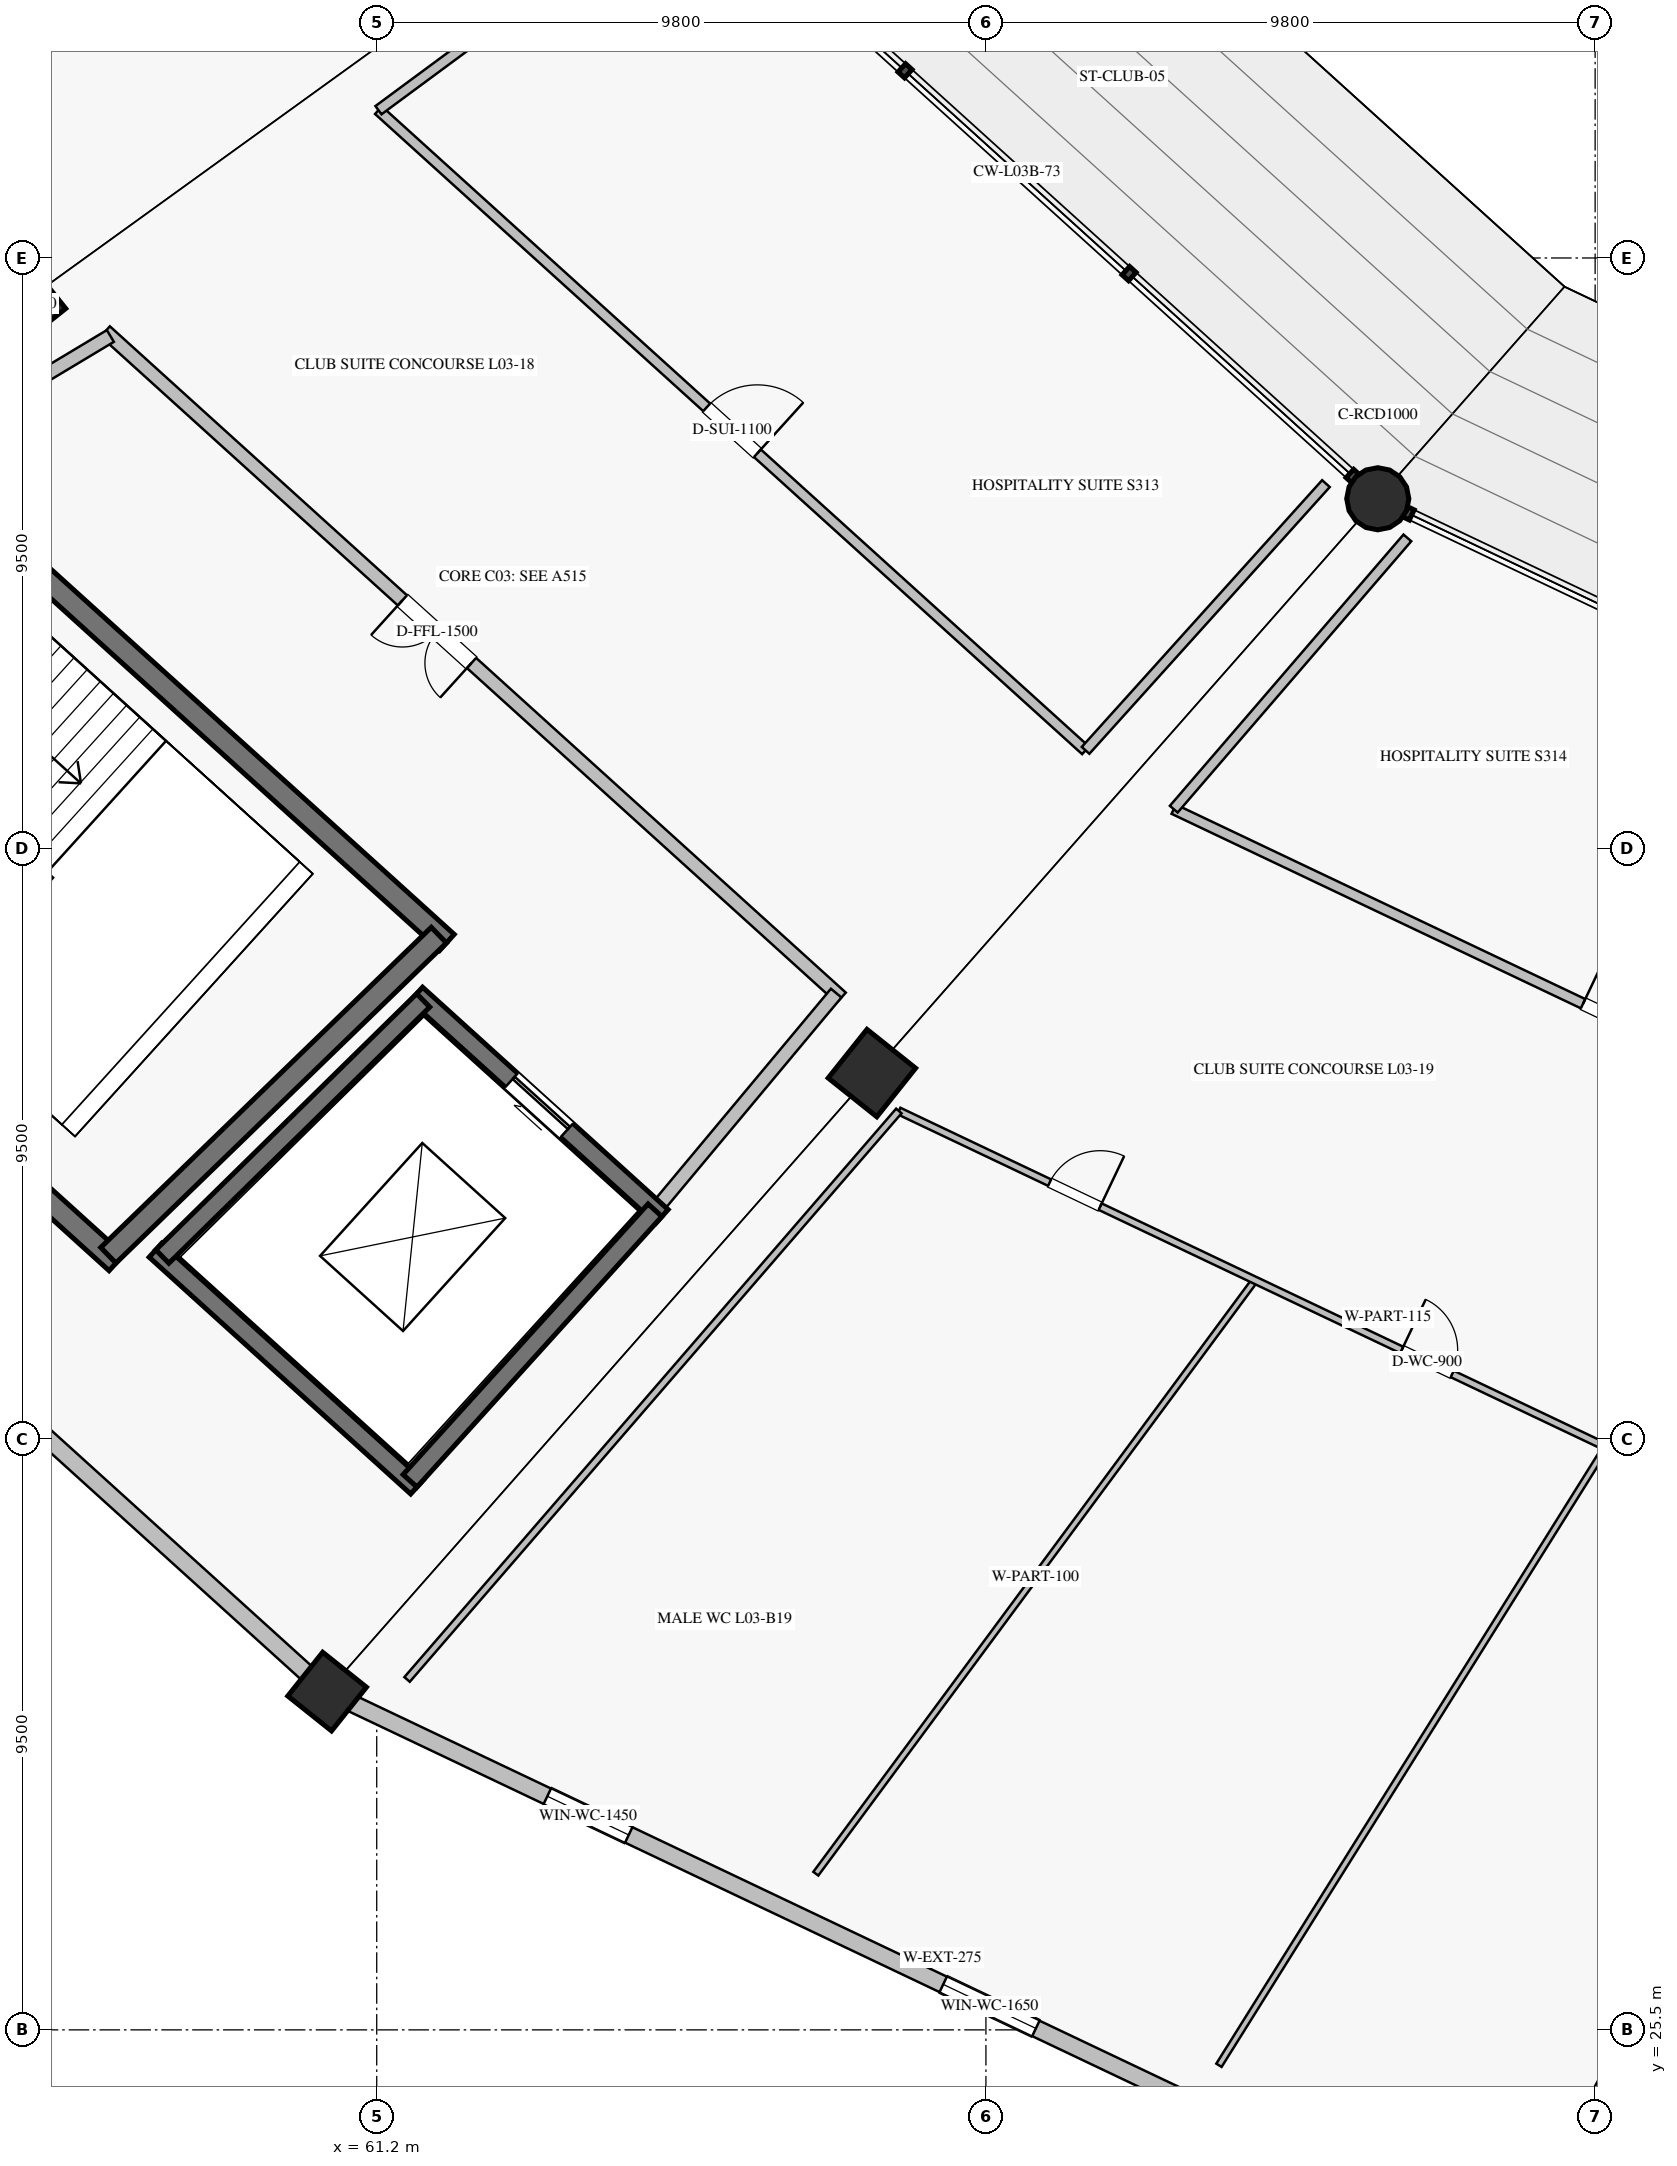
"""IFC4 building model, lengths in metres.
Left out: names, types, materials, properties, quantities, classifications, styles, units other than length and angle.
Written with IfcOpenShell. Run it as: python <this file> out.ifc"""

import sys

from ifc_helpers import new_model, si_unit, direction, frame, frame_2d, origin, origin_2d, place, context, subcontext, project, spatial, rectangle, circle, extrude, element, fill, save


model = new_model("IFC4")
c1 = context("Model", 3, precision=1e-05, world=origin(), true_north=direction((0.0, 1.0)))
c2 = subcontext(c1, "Body", "Model", "MODEL_VIEW")
j1 = project(units=[si_unit("LENGTHUNIT", "METRE"), si_unit("PLANEANGLEUNIT", "RADIAN")], contexts=[c1])
p1 = place(None, origin())
s1 = spatial("IfcSite", under=j1, at=p1, CompositionType="ELEMENT")
p2 = place(p1, origin())
s2 = spatial("IfcBuilding", under=s1, at=p2, CompositionType="ELEMENT")
p3 = place(p2, frame((0.0, 0.0, 15.64)))
s3 = spatial("IfcBuildingStorey", under=s2, at=p3, CompositionType="ELEMENT", Elevation=15.64)
p4 = place(p3, frame((77.303, 50.127, 0.0), z_axis=(0.0, 0.0, 1.0), x_axis=(-0.623489801853, -0.781831482473, 0.0)))
e1 = element("IfcColumn", 1, at=p4, inside=s3, PredefinedType="COLUMN", context=c2, shape_type="SweptSolid", body=[
    extrude(circle(Radius=0.5, at=origin_2d()), origin(), (0.0, 0.0, 1.0), 4.76),
])
for number, where, z_axis, x_axis in (
    (2, (55.494, 53.266, 0.0), (0.0, 0.0, 1.0), (-0.782, -0.623, 0.0)),
    (3, (69.166, 40.889, 0.0), (0.0, 0.0, 1.0), (-0.623, -0.782, 0.0)),
):
    element("IfcColumn", number, at=place(p3, frame(where, z_axis=z_axis, x_axis=x_axis)), inside=s3, PredefinedType="COLUMN", context=c2, shape_type="SweptSolid", body=[
        extrude(rectangle(XDim=1.0, YDim=1.0, at=origin_2d()), origin(), (0.0, 0.0, 1.0), 4.76),
    ])
p5 = place(p3, frame((60.402, 30.941, 0.0), z_axis=(0.0, 0.0, 1.0), x_axis=(-0.623489801853, -0.781831482473, 0.0)))
e4 = element("IfcColumn", 4, at=p5, inside=s3, PredefinedType="COLUMN", context=c2, shape_type="SweptSolid", body=[
    extrude(rectangle(XDim=0.9, YDim=0.9, at=origin_2d()), origin(), (0.0, 0.0, 1.0), 4.76),
])
p6 = place(p3, frame((44.831, 45.037, 0.0), z_axis=(0.0, 0.0, 1.0), x_axis=(0.741352367697, -0.671115986183, 0.0)))
e5 = element("IfcWall", 5, at=p6, inside=s3, PredefinedType="SOLIDWALL", context=c2, shape_type="SweptSolid", body=[
    extrude(rectangle(XDim=20.564, YDim=0.275, at=frame_2d((10.282, 0.0))), origin(), (0.0, 0.0, 1.0), 3.81),
])
p7 = place(p6, frame((1.4, 0.0, 1.0)))
e6 = element("IfcOpeningElement", 6, at=p7, cuts=e5, PredefinedType="OPENING", context=c2, shape_type="SweptSolid", body=[
    extrude(rectangle(XDim=3.2, YDim=2.2, at=frame_2d((1.6, 1.1))), frame((0.0, 0.147, 0.0), z_axis=(0.0, -1.0, 0.0), x_axis=(1.0, 0.0, 0.0)), (0.0, 0.0, 1.0), 0.295),
])
p8 = place(p3, frame((60.8, 30.752, 0.0), z_axis=(0.0, 0.0, 1.0), x_axis=(0.903214855299, -0.429188682478, 0.0)))
e7 = element("IfcWall", 7, at=p8, inside=s3, PredefinedType="SOLIDWALL", context=c2, shape_type="SweptSolid", body=[
    extrude(rectangle(XDim=21.034, YDim=0.275, at=frame_2d((10.517, 0.0))), origin(), (0.0, 0.0, 1.0), 3.81),
])
p9 = place(p8, frame((3.482, 0.0, 1.65)))
e8 = element("IfcOpeningElement", 8, at=p9, cuts=e7, PredefinedType="OPENING", context=c2, shape_type="SweptSolid", body=[
    extrude(rectangle(XDim=1.45, YDim=0.95, at=frame_2d((0.725, 0.475))), frame((0.0, 0.147, 0.0), z_axis=(0.0, -1.0, 0.0), x_axis=(1.0, 0.0, 0.0)), (0.0, 0.0, 1.0), 0.295),
])
p10 = place(p8, frame((10.533, 0.0, 1.65)))
e9 = element("IfcOpeningElement", 9, at=p10, cuts=e7, PredefinedType="OPENING", context=c2, shape_type="SweptSolid", body=[
    extrude(rectangle(XDim=1.65, YDim=1.0, at=frame_2d((0.825, 0.5))), frame((0.0, 0.147, 0.0), z_axis=(0.0, -1.0, 0.0), x_axis=(1.0, 0.0, 0.0)), (0.0, 0.0, 1.0), 0.295),
])
p11 = place(p8, frame((17.069, 0.0, 1.65)))
e10 = element("IfcOpeningElement", 10, at=p11, cuts=e7, PredefinedType="OPENING", context=c2, shape_type="SweptSolid", body=[
    extrude(rectangle(XDim=1.2, YDim=0.9, at=frame_2d((0.6, 0.45))), frame((0.0, 0.147, 0.0), z_axis=(0.0, -1.0, 0.0), x_axis=(1.0, 0.0, 0.0)), (0.0, 0.0, 1.0), 0.295),
])
p12 = place(p3, frame((53.561, 50.928, 0.0), z_axis=(0.0, 0.0, 1.0), x_axis=(0.741358227035, -0.671109513572, 0.0)))
e11 = element("IfcWall", 11, at=p12, inside=s3, PredefinedType="SHEAR", context=c2, shape_type="SweptSolid", body=[
    extrude(rectangle(XDim=11.827, YDim=0.35, at=frame_2d((5.913, 0.0))), origin(), (0.0, 0.0, 1.0), 4.46),
])
p13 = place(p12, frame((0.475, 0.0, 0.0)))
e12 = element("IfcOpeningElement", 12, at=p13, cuts=e11, PredefinedType="OPENING", context=c2, shape_type="SweptSolid", body=[
    extrude(rectangle(XDim=1.8, YDim=2.2, at=frame_2d((0.9, 1.1))), frame((0.0, 0.185, 0.0), z_axis=(0.0, -1.0, 0.0), x_axis=(1.0, 0.0, 0.0)), (0.0, 0.0, 1.0), 0.37),
])
p14 = place(p3, frame((47.501, 46.452, 0.0), z_axis=(0.0, 0.0, 1.0), x_axis=(0.741351373721, -0.671117084183, 0.0)))
e13 = element("IfcWall", 13, at=p14, inside=s3, PredefinedType="SHEAR", context=c2, shape_type="SweptSolid", body=[
    extrude(rectangle(XDim=12.83, YDim=0.35, at=frame_2d((6.415, 0.0))), origin(), (0.0, 0.0, 1.0), 4.46),
])
p15 = place(p3, frame((62.199, 43.108, 0.0), z_axis=(0.0, 0.0, 1.0), x_axis=(-0.718297398554, -0.69573619083, 0.0)))
e14 = element("IfcWall", 14, at=p15, inside=s3, PredefinedType="SHEAR", context=c2, shape_type="SweptSolid", body=[
    extrude(rectangle(XDim=7.402, YDim=0.35, at=frame_2d((3.701, 0.0))), origin(), (0.0, 0.0, 1.0), 4.46),
])
p16 = place(p3, frame((61.837, 42.159, 0.0), z_axis=(0.0, 0.0, 1.0), x_axis=(0.741350155641, -0.671118429736, 0.0)))
e15 = element("IfcWall", 15, at=p16, inside=s3, PredefinedType="SHEAR", context=c2, shape_type="SweptSolid", body=[
    extrude(rectangle(XDim=5.329, YDim=0.3, at=frame_2d((2.665, 0.0))), origin(), (0.0, 0.0, 1.0), 4.46),
])
p17 = place(p16, frame((2.065, 0.0, 0.0)))
e16 = element("IfcOpeningElement", 16, at=p17, cuts=e15, PredefinedType="OPENING", context=c2, shape_type="SweptSolid", body=[
    extrude(rectangle(XDim=1.2, YDim=2.2, at=frame_2d((0.6, 1.1))), frame((0.0, 0.16, 0.0), z_axis=(0.0, -1.0, 0.0), x_axis=(1.0, 0.0, 0.0)), (0.0, 0.0, 1.0), 0.32),
])
p18 = place(p3, frame((57.64, 38.039, 0.0), z_axis=(0.0, 0.0, 1.0), x_axis=(0.74134208775, -0.671127341815, 0.0)))
e17 = element("IfcWall", 17, at=p18, inside=s3, PredefinedType="SHEAR", context=c2, shape_type="SweptSolid", body=[
    extrude(rectangle(XDim=5.675, YDim=0.3, at=frame_2d((2.837, 0.0))), origin(), (0.0, 0.0, 1.0), 4.46),
])
p19 = place(p3, frame((61.948, 42.059, 0.0), z_axis=(0.0, 0.0, 1.0), x_axis=(-0.713553028001, -0.700601224828, 0.0)))
e18 = element("IfcWall", 18, at=p19, inside=s3, PredefinedType="SHEAR", context=c2, shape_type="SweptSolid", body=[
    extrude(rectangle(XDim=5.881, YDim=0.3, at=frame_2d((2.94, 0.0))), origin(), (0.0, 0.0, 1.0), 4.46),
])
p20 = place(p3, frame((65.676, 38.684, 0.0), z_axis=(0.0, 0.0, 1.0), x_axis=(-0.67115829282, -0.741314067031, 0.0)))
e19 = element("IfcWall", 19, at=p20, inside=s3, PredefinedType="SHEAR", context=c2, shape_type="SweptSolid", body=[
    extrude(rectangle(XDim=5.871, YDim=0.3, at=frame_2d((2.935, 0.0))), origin(), (0.0, 0.0, 1.0), 4.46),
])
p21 = place(p3, frame((56.834, 52.819, 0.0), z_axis=(0.0, 0.0, 1.0), x_axis=(0.741351035574, -0.671117457717, 0.0)))
e20 = element("IfcWall", 20, at=p21, inside=s3, PredefinedType="SOLIDWALL", context=c2, shape_type="SweptSolid", body=[
    extrude(rectangle(XDim=15.969, YDim=0.22, at=frame_2d((7.985, 0.0))), origin(), (0.0, 0.0, 1.0), 4.46),
])
p22 = place(p21, frame((6.447, 0.0, 0.0)))
e21 = element("IfcOpeningElement", 21, at=p22, cuts=e20, PredefinedType="OPENING", context=c2, shape_type="SweptSolid", body=[
    extrude(rectangle(XDim=1.5, YDim=2.2, at=frame_2d((0.75, 1.1))), frame((0.0, 0.12, 0.0), z_axis=(0.0, -1.0, 0.0), x_axis=(1.0, 0.0, 0.0)), (0.0, 0.0, 1.0), 0.24),
])
p23 = place(p3, frame((56.915, 52.746, 0.0), z_axis=(0.0, 0.0, 1.0), x_axis=(-0.857424171966, -0.514610327654, 0.0)))
e22 = element("IfcWall", 22, at=p23, inside=s3, PredefinedType="SOLIDWALL", context=c2, shape_type="SweptSolid", body=[
    extrude(rectangle(XDim=3.76, YDim=0.22, at=frame_2d((1.88, 0.0))), origin(), (0.0, 0.0, 1.0), 4.46),
])
p24 = place(p3, frame((68.591, 42.176, 0.0), z_axis=(0.0, 0.0, 1.0), x_axis=(-0.640759627034, -0.767741558315, 0.0)))
e23 = element("IfcWall", 23, at=p24, inside=s3, PredefinedType="SOLIDWALL", context=c2, shape_type="SweptSolid", body=[
    extrude(rectangle(XDim=4.549, YDim=0.22, at=frame_2d((2.274, 0.0))), origin(), (0.0, 0.0, 1.0), 4.46),
])
p25 = place(p3, frame((69.599, 40.28, 0.0), z_axis=(0.0, 0.0, 1.0), x_axis=(0.903217202186, -0.429183743488, 0.0)))
e24 = element("IfcWall", 24, at=p25, inside=s3, PredefinedType="PARTITIONING", context=c2, shape_type="SweptSolid", body=[
    extrude(rectangle(XDim=17.419, YDim=0.115, at=frame_2d((8.709, 0.0))), origin(), (0.0, 0.0, 1.0), 3.78),
])
p26 = place(p25, frame((2.685, 0.0, 0.0)))
e25 = element("IfcOpeningElement", 25, at=p26, cuts=e24, PredefinedType="OPENING", context=c2, shape_type="SweptSolid", body=[
    extrude(rectangle(XDim=0.9, YDim=2.1, at=frame_2d((0.45, 1.05))), frame((0.0, 0.067, 0.0), z_axis=(0.0, -1.0, 0.0), x_axis=(1.0, 0.0, 0.0)), (0.0, 0.0, 1.0), 0.135),
])
p27 = place(p25, frame((8.956, 0.0, 0.0)))
e26 = element("IfcOpeningElement", 26, at=p27, cuts=e24, PredefinedType="OPENING", context=c2, shape_type="SweptSolid", body=[
    extrude(rectangle(XDim=0.9, YDim=2.1, at=frame_2d((0.45, 1.05))), frame((0.0, 0.067, 0.0), z_axis=(0.0, -1.0, 0.0), x_axis=(1.0, 0.0, 0.0)), (0.0, 0.0, 1.0), 0.135),
])
p28 = place(p25, frame((14.455, 0.0, 0.0)))
e27 = element("IfcOpeningElement", 27, at=p28, cuts=e24, PredefinedType="OPENING", context=c2, shape_type="SweptSolid", body=[
    extrude(rectangle(XDim=1.05, YDim=2.1, at=frame_2d((0.525, 1.05))), frame((0.0, 0.067, 0.0), z_axis=(0.0, -1.0, 0.0), x_axis=(1.0, 0.0, 0.0)), (0.0, 0.0, 1.0), 0.135),
])
p29 = place(p3, frame((69.599, 40.28, 0.0), z_axis=(0.0, 0.0, 1.0), x_axis=(-0.654293035882, -0.756241114458, 0.0)))
e28 = element("IfcWall", 28, at=p29, inside=s3, PredefinedType="PARTITIONING", context=c2, shape_type="SweptSolid", body=[
    extrude(rectangle(XDim=12.091, YDim=0.115, at=frame_2d((6.045, 0.0))), origin(), (0.0, 0.0, 1.0), 3.78),
])
p30 = place(p3, frame((85.333, 32.804, 0.0), z_axis=(0.0, 0.0, 1.0), x_axis=(-0.478125060974, -0.878291765912, 0.0)))
e29 = element("IfcWall", 29, at=p30, inside=s3, PredefinedType="PARTITIONING", context=c2, shape_type="SweptSolid", body=[
    extrude(rectangle(XDim=11.672, YDim=0.115, at=frame_2d((5.836, 0.0))), origin(), (0.0, 0.0, 1.0), 3.78),
])
p31 = place(p3, frame((75.326, 37.559, 0.0), z_axis=(0.0, 0.0, 1.0), x_axis=(-0.594760374645, -0.803903039397, 0.0)))
e30 = element("IfcWall", 30, at=p31, inside=s3, PredefinedType="PARTITIONING", context=c2, shape_type="SweptSolid", body=[
    extrude(rectangle(XDim=11.875, YDim=0.1, at=frame_2d((5.938, 0.0))), origin(), (0.0, 0.0, 1.0), 3.78),
])
p32 = place(p3, frame((80.975, 34.875, 0.0), z_axis=(0.0, 0.0, 1.0), x_axis=(-0.530664656497, -0.847581867636, 0.0)))
e31 = element("IfcWall", 31, at=p32, inside=s3, PredefinedType="PARTITIONING", context=c2, shape_type="SweptSolid", body=[
    extrude(rectangle(XDim=11.733, YDim=0.1, at=frame_2d((5.866, 0.0))), origin(), (0.0, 0.0, 1.0), 3.78),
])
p33 = place(p3, frame((61.228, 56.377, 0.0), z_axis=(0.0, 0.0, 1.0), x_axis=(0.741351792112, -0.671116622006, 0.0)))
e32 = element("IfcWall", 32, at=p33, inside=s3, PredefinedType="PARTITIONING", context=c2, shape_type="SweptSolid", body=[
    extrude(rectangle(XDim=15.343, YDim=0.165, at=frame_2d((7.672, 0.0))), origin(), (0.0, 0.0, 1.0), 3.78),
])
p34 = place(p33, frame((7.122, 0.0, 0.0)))
e33 = element("IfcOpeningElement", 33, at=p34, cuts=e32, PredefinedType="OPENING", context=c2, shape_type="SweptSolid", body=[
    extrude(rectangle(XDim=1.1, YDim=2.25, at=frame_2d((0.55, 1.125))), frame((0.0, 0.093, 0.0), z_axis=(0.0, -1.0, 0.0), x_axis=(1.0, 0.0, 0.0)), (0.0, 0.0, 1.0), 0.185),
])
p35 = place(p3, frame((61.228, 56.377, 0.0), z_axis=(0.0, 0.0, 1.0), x_axis=(0.804403413526, 0.594083452309, 0.0)))
e34 = element("IfcWall", 34, at=p35, inside=s3, PredefinedType="PARTITIONING", context=c2, shape_type="SweptSolid", body=[
    extrude(rectangle(XDim=5.892, YDim=0.165, at=frame_2d((2.946, 0.0))), origin(), (0.0, 0.0, 1.0), 3.78),
])
p36 = place(p3, frame((72.603, 46.08, 0.0), z_axis=(0.0, 0.0, 1.0), x_axis=(0.669466645314, 0.742842117015, 0.0)))
e35 = element("IfcWall", 35, at=p36, inside=s3, PredefinedType="PARTITIONING", context=c2, shape_type="SweptSolid", body=[
    extrude(rectangle(XDim=5.776, YDim=0.165, at=frame_2d((2.888, 0.0))), origin(), (0.0, 0.0, 1.0), 3.78),
])
p37 = place(p3, frame((74.021, 45.134, 0.0), z_axis=(0.0, 0.0, 1.0), x_axis=(0.903213075216, -0.42919242859, 0.0)))
e36 = element("IfcWall", 36, at=p37, inside=s3, PredefinedType="PARTITIONING", context=c2, shape_type="SweptSolid", body=[
    extrude(rectangle(XDim=15.679, YDim=0.165, at=frame_2d((7.84, 0.0))), origin(), (0.0, 0.0, 1.0), 3.78),
])
p38 = place(p37, frame((7.29, 0.0, 0.0)))
e37 = element("IfcOpeningElement", 37, at=p38, cuts=e36, PredefinedType="OPENING", context=c2, shape_type="SweptSolid", body=[
    extrude(rectangle(XDim=1.1, YDim=2.25, at=frame_2d((0.55, 1.125))), frame((0.0, 0.093, 0.0), z_axis=(0.0, -1.0, 0.0), x_axis=(1.0, 0.0, 0.0)), (0.0, 0.0, 1.0), 0.185),
])
p39 = place(p3, frame((74.021, 45.134, 0.0), z_axis=(0.0, 0.0, 1.0), x_axis=(0.652601574789, 0.757701250219, 0.0)))
e38 = element("IfcWall", 38, at=p39, inside=s3, PredefinedType="PARTITIONING", context=c2, shape_type="SweptSolid", body=[
    extrude(rectangle(XDim=5.759, YDim=0.165, at=frame_2d((2.879, 0.0))), origin(), (0.0, 0.0, 1.0), 3.78),
])
p40 = place(p9, origin())
e39 = element("IfcWindow", 39, at=p40, inside=s3, PartitioningType="SINGLE_PANEL", PredefinedType="WINDOW", context=c2, shape_type="SweptSolid", body=[
    extrude(rectangle(XDim=1.45, YDim=0.95, at=frame_2d((0.725, 0.475))), frame((0.0, 0.03, 0.0), z_axis=(0.0, -1.0, 0.0), x_axis=(1.0, 0.0, 0.0)), (0.0, 0.0, 1.0), 0.06),
])
fill(e8, e39)
p41 = place(p10, origin())
e40 = element("IfcWindow", 40, at=p41, inside=s3, PartitioningType="SINGLE_PANEL", PredefinedType="WINDOW", context=c2, shape_type="SweptSolid", body=[
    extrude(rectangle(XDim=1.65, YDim=1.0, at=frame_2d((0.825, 0.5))), frame((0.0, 0.03, 0.0), z_axis=(0.0, -1.0, 0.0), x_axis=(1.0, 0.0, 0.0)), (0.0, 0.0, 1.0), 0.06),
])
fill(e9, e40)
p42 = place(p17, origin())
e41 = element("IfcDoor", 41, at=p42, inside=s3, OperationType="SLIDING_TO_LEFT", PredefinedType="DOOR", context=c2, shape_type="SweptSolid", body=[
    extrude(rectangle(XDim=1.2, YDim=2.2, at=frame_2d((0.6, 1.1))), frame((0.0, 0.025, 0.0), z_axis=(0.0, -1.0, 0.0), x_axis=(1.0, 0.0, 0.0)), (0.0, 0.0, 1.0), 0.05),
])
fill(e16, e41)
p43 = place(p22, frame((1.5, 0.0, 0.0), z_axis=(0.0, 0.0, 1.0), x_axis=(-1.0, 0.0, 0.0)))
e42 = element("IfcDoor", 42, at=p43, inside=s3, OperationType="DOUBLE_DOOR_SINGLE_SWING", PredefinedType="DOOR", context=c2, shape_type="SweptSolid", body=[
    extrude(rectangle(XDim=1.5, YDim=2.2, at=frame_2d((0.75, 1.1))), frame((0.0, 0.025, 0.0), z_axis=(0.0, -1.0, 0.0), x_axis=(1.0, 0.0, 0.0)), (0.0, 0.0, 1.0), 0.05),
])
fill(e21, e42)
p44 = place(p26, origin())
e43 = element("IfcDoor", 43, at=p44, inside=s3, OperationType="SINGLE_SWING_RIGHT", PredefinedType="DOOR", context=c2, shape_type="SweptSolid", body=[
    extrude(rectangle(XDim=0.9, YDim=2.1, at=frame_2d((0.45, 1.05))), frame((0.0, 0.025, 0.0), z_axis=(0.0, -1.0, 0.0), x_axis=(1.0, 0.0, 0.0)), (0.0, 0.0, 1.0), 0.05),
])
fill(e25, e43)
p45 = place(p27, origin())
e44 = element("IfcDoor", 44, at=p45, inside=s3, OperationType="SINGLE_SWING_LEFT", PredefinedType="DOOR", context=c2, shape_type="SweptSolid", body=[
    extrude(rectangle(XDim=0.9, YDim=2.1, at=frame_2d((0.45, 1.05))), frame((0.0, 0.025, 0.0), z_axis=(0.0, -1.0, 0.0), x_axis=(1.0, 0.0, 0.0)), (0.0, 0.0, 1.0), 0.05),
])
fill(e26, e44)
p46 = place(p34, origin())
e45 = element("IfcDoor", 45, at=p46, inside=s3, OperationType="SINGLE_SWING_RIGHT", PredefinedType="DOOR", context=c2, shape_type="SweptSolid", body=[
    extrude(rectangle(XDim=1.1, YDim=2.25, at=frame_2d((0.55, 1.125))), frame((0.0, 0.025, 0.0), z_axis=(0.0, -1.0, 0.0), x_axis=(1.0, 0.0, 0.0)), (0.0, 0.0, 1.0), 0.05),
])
fill(e33, e45)
p47 = place(p38, origin())
e46 = element("IfcDoor", 46, at=p47, inside=s3, OperationType="SINGLE_SWING_LEFT", PredefinedType="DOOR", context=c2, shape_type="SweptSolid", body=[
    extrude(rectangle(XDim=1.1, YDim=2.25, at=frame_2d((0.55, 1.125))), frame((0.0, 0.025, 0.0), z_axis=(0.0, -1.0, 0.0), x_axis=(1.0, 0.0, 0.0)), (0.0, 0.0, 1.0), 0.05),
])
fill(e37, e46)
save(model, sys.argv[1])
